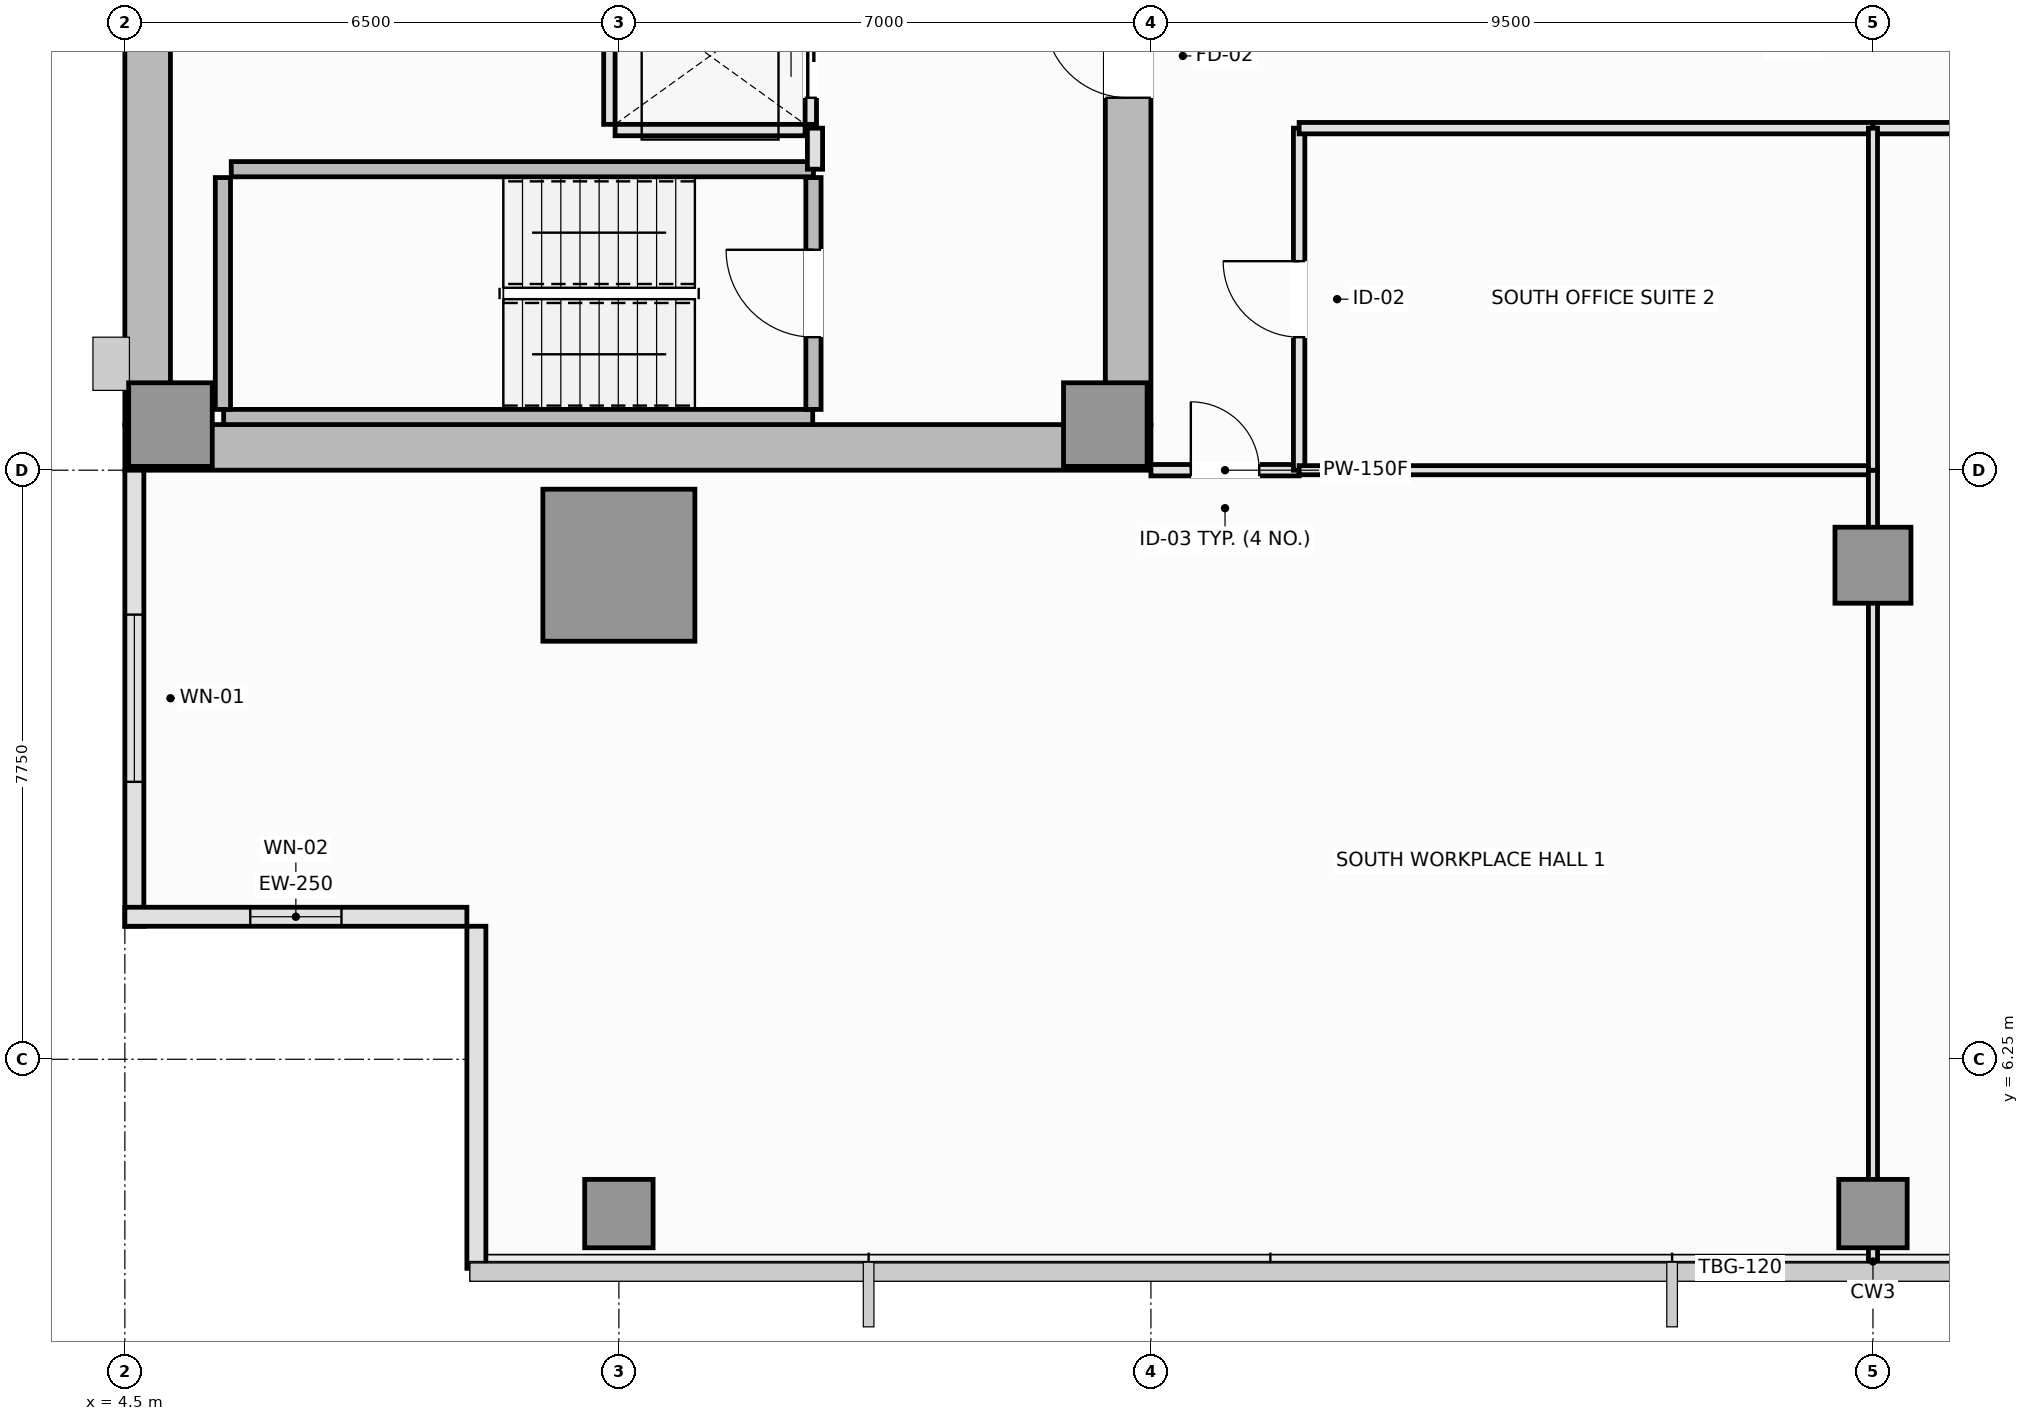
"""IFC4 building model, lengths in metres.
Left out: names, types, materials, properties, quantities, classifications, styles, units other than length and angle.
Written with IfcOpenShell. Run it as: python <this file> out.ifc"""

import sys

from ifc_helpers import new_model, si_unit, direction, frame, frame_2d, origin, origin_2d, place, context, subcontext, project, spatial, rectangle, extrude, element, fill, save


model = new_model("IFC4")
c1 = context("Model", 3, precision=1e-05, world=origin(), true_north=direction((0.0, 1.0)))
c2 = subcontext(c1, "Body", "Model", "MODEL_VIEW")
j1 = project(units=[si_unit("LENGTHUNIT", "METRE"), si_unit("PLANEANGLEUNIT", "RADIAN")], contexts=[c1])
p1 = place(None, origin())
s1 = spatial("IfcSite", under=j1, at=p1, CompositionType="ELEMENT")
p2 = place(p1, origin())
s2 = spatial("IfcBuilding", under=s1, at=p2, CompositionType="ELEMENT")
p3 = place(p2, frame((0.0, 0.0, 137.75)))
s3 = spatial("IfcBuildingStorey", under=s2, at=p3, CompositionType="ELEMENT", Elevation=137.75)
p4 = place(p3, frame((4.5, 14.3, 0.0), z_axis=(0.0, 0.0, 1.0), x_axis=(1.0, 0.0, 0.0)))
e1 = element("IfcWall", 1, at=p4, inside=s3, PredefinedType="SHEAR", context=c2, shape_type="SweptSolid", body=[
    extrude(rectangle(XDim=13.5, YDim=0.6, at=frame_2d((6.75, 0.0))), origin(), (0.0, 0.0, 1.0), 3.55),
])
p5 = place(p3, frame((4.8, 14.6, 0.0), z_axis=(0.0, 0.0, 1.0), x_axis=(0.0, 1.0, 0.0)))
e2 = element("IfcWall", 2, at=p5, inside=s3, PredefinedType="SHEAR", context=c2, shape_type="SweptSolid", body=[
    extrude(rectangle(XDim=21.3, YDim=0.6, at=frame_2d((10.65, 0.0))), origin(), (0.0, 0.0, 1.0), 3.55),
])
p6 = place(p3, frame((17.7, 14.6, 0.0), z_axis=(0.0, 0.0, 1.0), x_axis=(0.0, 1.0, 0.0)))
e3 = element("IfcWall", 3, at=p6, inside=s3, PredefinedType="SHEAR", context=c2, shape_type="SweptSolid", body=[
    extrude(rectangle(XDim=8.85, YDim=0.6, at=frame_2d((4.425, 0.0))), origin(), (0.0, 0.0, 1.0), 3.55),
])
p7 = place(p6, frame((4.3, 0.0, 0.0)))
e4 = element("IfcOpeningElement", 4, at=p7, cuts=e3, PredefinedType="OPENING", context=c2, shape_type="SweptSolid", body=[
    extrude(rectangle(XDim=1.1, YDim=2.15, at=frame_2d((0.55, 1.075))), frame((0.0, 0.31, 0.0), z_axis=(0.0, -1.0, 0.0), x_axis=(1.0, 0.0, 0.0)), (0.0, 0.0, 1.0), 0.62),
])
for number, where, z_axis, x_axis in (
    (5, (5.1, 14.6, 0.0), (0.0, 0.0, 1.0), (1.0, 0.0, 0.0)),
    (6, (17.4, 14.6, 0.0), (0.0, 0.0, 1.0), (1.0, 0.0, 0.0)),
):
    element("IfcColumn", number, at=place(p3, frame(where, z_axis=z_axis, x_axis=x_axis)), inside=s3, PredefinedType="PILASTER", context=c2, shape_type="SweptSolid", body=[
        extrude(rectangle(XDim=1.1, YDim=1.1, at=origin_2d()), origin(), (0.0, 0.0, 1.0), 3.55),
    ])
p8 = place(p3, frame((11.0, 12.75, 0.0), z_axis=(0.0, 0.0, 1.0), x_axis=(1.0, 0.0, 0.0)))
e7 = element("IfcColumn", 7, at=p8, inside=s3, PredefinedType="COLUMN", context=c2, shape_type="SweptSolid", body=[
    extrude(rectangle(XDim=2.0, YDim=2.0, at=origin_2d()), origin(), (0.0, 0.0, 1.0), 3.55),
])
p9 = place(p3, frame((27.5, 12.75, 0.0), z_axis=(0.0, 0.0, 1.0), x_axis=(1.0, 0.0, 0.0)))
e8 = element("IfcColumn", 8, at=p9, inside=s3, PredefinedType="COLUMN", context=c2, shape_type="SweptSolid", body=[
    extrude(rectangle(XDim=1.0, YDim=1.0, at=origin_2d()), origin(), (0.0, 0.0, 1.0), 3.55),
])
for number, where, z_axis, x_axis in (
    (9, (11.0, 4.22, 0.0), (0.0, 0.0, 1.0), (1.0, 0.0, 0.0)),
    (10, (27.5, 4.22, 0.0), (0.0, 0.0, 1.0), (1.0, 0.0, 0.0)),
):
    element("IfcColumn", number, at=place(p3, frame(where, z_axis=z_axis, x_axis=x_axis)), inside=s3, PredefinedType="COLUMN", context=c2, shape_type="SweptSolid", body=[
        extrude(rectangle(XDim=0.9, YDim=0.9, at=origin_2d()), origin(), (0.0, 0.0, 1.0), 3.55),
    ])
p10 = place(p3, frame((4.625, 14.0, 0.0), z_axis=(0.0, 0.0, 1.0), x_axis=(0.0, -1.0, 0.0)))
e11 = element("IfcWall", 11, at=p10, inside=s3, PredefinedType="SOLIDWALL", context=c2, shape_type="SweptSolid", body=[
    extrude(rectangle(XDim=6.0, YDim=0.25, at=frame_2d((3.0, 0.0))), origin(), (0.0, 0.0, 1.0), 3.37),
])
p11 = place(p10, frame((1.9, 0.0, 0.9)))
e12 = element("IfcOpeningElement", 12, at=p11, cuts=e11, PredefinedType="OPENING", context=c2, shape_type="SweptSolid", body=[
    extrude(rectangle(XDim=2.2, YDim=1.8, at=frame_2d((1.1, 0.9))), frame((0.0, 0.135, 0.0), z_axis=(0.0, -1.0, 0.0), x_axis=(1.0, 0.0, 0.0)), (0.0, 0.0, 1.0), 0.27),
])
p12 = place(p3, frame((4.5, 8.125, 0.0), z_axis=(0.0, 0.0, 1.0), x_axis=(1.0, 0.0, 0.0)))
e13 = element("IfcWall", 13, at=p12, inside=s3, PredefinedType="SOLIDWALL", context=c2, shape_type="SweptSolid", body=[
    extrude(rectangle(XDim=4.5, YDim=0.25, at=frame_2d((2.25, 0.0))), origin(), (0.0, 0.0, 1.0), 3.37),
])
p13 = place(p12, frame((1.65, 0.0, 0.9)))
e14 = element("IfcOpeningElement", 14, at=p13, cuts=e13, PredefinedType="OPENING", context=c2, shape_type="SweptSolid", body=[
    extrude(rectangle(XDim=1.2, YDim=1.8, at=frame_2d((0.6, 0.9))), frame((0.0, 0.135, 0.0), z_axis=(0.0, -1.0, 0.0), x_axis=(1.0, 0.0, 0.0)), (0.0, 0.0, 1.0), 0.27),
])
p14 = place(p3, frame((9.125, 8.0, 0.0), z_axis=(0.0, 0.0, 1.0), x_axis=(0.0, -1.0, 0.0)))
e15 = element("IfcWall", 15, at=p14, inside=s3, PredefinedType="SOLIDWALL", context=c2, shape_type="SweptSolid", body=[
    extrude(rectangle(XDim=4.5, YDim=0.25, at=frame_2d((2.25, 0.0))), origin(), (0.0, 0.0, 1.0), 3.37),
])
p15 = place(p3, frame((5.8, 14.7, 0.0), z_axis=(0.0, 0.0, 1.0), x_axis=(1.0, 0.0, 0.0)))
e16 = element("IfcWall", 16, at=p15, inside=s3, PredefinedType="SOLIDWALL", context=c2, shape_type="SweptSolid", body=[
    extrude(rectangle(XDim=7.75, YDim=0.2, at=frame_2d((3.875, 0.0))), origin(), (0.0, 0.0, 1.0), 3.55),
])
p16 = place(p3, frame((5.79, 14.8, 0.0), z_axis=(0.0, 0.0, 1.0), x_axis=(0.0, 1.0, 0.0)))
e17 = element("IfcWall", 17, at=p16, inside=s3, PredefinedType="SOLIDWALL", context=c2, shape_type="SweptSolid", body=[
    extrude(rectangle(XDim=3.05, YDim=0.2, at=frame_2d((1.525, 0.0))), origin(), (0.0, 0.0, 1.0), 3.55),
])
p17 = place(p3, frame((5.9, 17.96, 0.0), z_axis=(0.0, 0.0, 1.0), x_axis=(1.0, 0.0, 0.0)))
e18 = element("IfcWall", 18, at=p17, inside=s3, PredefinedType="SOLIDWALL", context=c2, shape_type="SweptSolid", body=[
    extrude(rectangle(XDim=7.66, YDim=0.2, at=frame_2d((3.83, 0.0))), origin(), (0.0, 0.0, 1.0), 3.55),
])
p18 = place(p3, frame((13.56, 14.8, 0.0), z_axis=(0.0, 0.0, 1.0), x_axis=(0.0, 1.0, 0.0)))
e19 = element("IfcWall", 19, at=p18, inside=s3, PredefinedType="SOLIDWALL", context=c2, shape_type="SweptSolid", body=[
    extrude(rectangle(XDim=3.05, YDim=0.2, at=frame_2d((1.525, 0.0))), origin(), (0.0, 0.0, 1.0), 3.55),
])
p19 = place(p18, frame((0.95, 0.0, 0.0)))
e20 = element("IfcOpeningElement", 20, at=p19, cuts=e19, PredefinedType="OPENING", context=c2, shape_type="SweptSolid", body=[
    extrude(rectangle(XDim=1.15, YDim=2.15, at=frame_2d((0.575, 1.075))), frame((0.0, 0.11, 0.0), z_axis=(0.0, -1.0, 0.0), x_axis=(1.0, 0.0, 0.0)), (0.0, 0.0, 1.0), 0.22),
])
p20 = place(p3, frame((10.95, 18.475, 0.0), z_axis=(0.0, 0.0, 1.0), x_axis=(1.0, 0.0, 0.0)))
e21 = element("IfcWall", 21, at=p20, inside=s3, PredefinedType="PARTITIONING", context=c2, shape_type="SweptSolid", body=[
    extrude(rectangle(XDim=2.5, YDim=0.15, at=frame_2d((1.25, 0.0))), origin(), (0.0, 0.0, 1.0), 3.37),
])
p21 = place(p3, frame((10.875, 18.55, 0.0), z_axis=(0.0, 0.0, 1.0), x_axis=(0.0, 1.0, 0.0)))
e22 = element("IfcWall", 22, at=p21, inside=s3, PredefinedType="PARTITIONING", context=c2, shape_type="SweptSolid", body=[
    extrude(rectangle(XDim=1.8, YDim=0.15, at=frame_2d((0.9, 0.0))), origin(), (0.0, 0.0, 1.0), 3.37),
])
p22 = place(p3, frame((13.525, 18.55, 0.0), z_axis=(0.0, 0.0, 1.0), x_axis=(0.0, 1.0, 0.0)))
e23 = element("IfcWall", 23, at=p22, inside=s3, PredefinedType="PARTITIONING", context=c2, shape_type="SweptSolid", body=[
    extrude(rectangle(XDim=1.8, YDim=0.15, at=frame_2d((0.9, 0.0))), origin(), (0.0, 0.0, 1.0), 3.37),
])
p23 = place(p22, frame((0.35, 0.0, 0.0)))
e24 = element("IfcOpeningElement", 24, at=p23, cuts=e23, PredefinedType="OPENING", context=c2, shape_type="SweptSolid", body=[
    extrude(rectangle(XDim=1.1, YDim=2.2, at=frame_2d((0.55, 1.1))), frame((0.0, 0.085, 0.0), z_axis=(0.0, -1.0, 0.0), x_axis=(1.0, 0.0, 0.0)), (0.0, 0.0, 1.0), 0.17),
])
p24 = place(p3, frame((13.58, 17.96, 0.0), z_axis=(0.0, 0.0, 1.0), x_axis=(0.0, 1.0, 0.0)))
e25 = element("IfcWall", 25, at=p24, inside=s3, PredefinedType="PARTITIONING", context=c2, shape_type="SweptSolid", body=[
    extrude(rectangle(XDim=0.54, YDim=0.2, at=frame_2d((0.27, 0.0))), origin(), (0.0, 0.0, 1.0), 3.37),
])
p25 = place(p3, frame((18.0, 14.0, 0.0), z_axis=(0.0, 0.0, 1.0), x_axis=(1.0, 0.0, 0.0)))
e26 = element("IfcWall", 26, at=p25, inside=s3, PredefinedType="PARTITIONING", context=c2, shape_type="SweptSolid", body=[
    extrude(rectangle(XDim=1.95, YDim=0.15, at=frame_2d((0.975, 0.0))), origin(), (0.0, 0.0, 1.0), 3.37),
])
p26 = place(p25, frame((0.525, 0.0, 0.0)))
e27 = element("IfcOpeningElement", 27, at=p26, cuts=e26, PredefinedType="OPENING", context=c2, shape_type="SweptSolid", body=[
    extrude(rectangle(XDim=0.9, YDim=2.1, at=frame_2d((0.45, 1.05))), frame((0.0, 0.085, 0.0), z_axis=(0.0, -1.0, 0.0), x_axis=(1.0, 0.0, 0.0)), (0.0, 0.0, 1.0), 0.17),
])
p27 = place(p3, frame((19.95, 14.0, 0.0), z_axis=(0.0, 0.0, 1.0), x_axis=(0.0, 1.0, 0.0)))
e28 = element("IfcWall", 28, at=p27, inside=s3, PredefinedType="PARTITIONING", context=c2, shape_type="SweptSolid", body=[
    extrude(rectangle(XDim=4.5, YDim=0.15, at=frame_2d((2.25, 0.0))), origin(), (0.0, 0.0, 1.0), 3.37),
])
p28 = place(p27, frame((1.75, 0.0, 0.0)))
e29 = element("IfcOpeningElement", 29, at=p28, cuts=e28, PredefinedType="OPENING", context=c2, shape_type="SweptSolid", body=[
    extrude(rectangle(XDim=1.0, YDim=2.15, at=frame_2d((0.5, 1.075))), frame((0.0, 0.085, 0.0), z_axis=(0.0, -1.0, 0.0), x_axis=(1.0, 0.0, 0.0)), (0.0, 0.0, 1.0), 0.17),
])
p29 = place(p3, frame((19.95, 18.5, 0.0), z_axis=(0.0, 0.0, 1.0), x_axis=(1.0, 0.0, 0.0)))
e30 = element("IfcWall", 30, at=p29, inside=s3, PredefinedType="PARTITIONING", context=c2, shape_type="SweptSolid", body=[
    extrude(rectangle(XDim=7.55, YDim=0.15, at=frame_2d((3.775, 0.0))), origin(), (0.0, 0.0, 1.0), 2.77),
])
p30 = place(p3, frame((27.5, 18.5, 0.0), z_axis=(0.0, 0.0, 1.0), x_axis=(1.0, 0.0, 0.0)))
e31 = element("IfcWall", 31, at=p30, inside=s3, PredefinedType="PARTITIONING", context=c2, shape_type="SweptSolid", body=[
    extrude(rectangle(XDim=5.9, YDim=0.15, at=frame_2d((2.95, 0.0))), origin(), (0.0, 0.0, 1.0), 2.77),
])
p31 = place(p30, frame((2.45, 0.0, 0.0)))
e32 = element("IfcOpeningElement", 32, at=p31, cuts=e31, PredefinedType="OPENING", context=c2, shape_type="SweptSolid", body=[
    extrude(rectangle(XDim=1.0, YDim=2.15, at=frame_2d((0.5, 1.075))), frame((0.0, 0.085, 0.0), z_axis=(0.0, -1.0, 0.0), x_axis=(1.0, 0.0, 0.0)), (0.0, 0.0, 1.0), 0.17),
])
p32 = place(p3, frame((19.95, 14.0, 0.0), z_axis=(0.0, 0.0, 1.0), x_axis=(1.0, 0.0, 0.0)))
e33 = element("IfcWall", 33, at=p32, inside=s3, PredefinedType="PARTITIONING", context=c2, shape_type="SweptSolid", body=[
    extrude(rectangle(XDim=7.55, YDim=0.12, at=frame_2d((3.775, 0.0))), origin(), (0.0, 0.0, 1.0), 3.37),
])
p33 = place(p3, frame((27.5, 3.51, 0.0), z_axis=(0.0, 0.0, 1.0), x_axis=(0.0, 1.0, 0.0)))
e34 = element("IfcWall", 34, at=p33, inside=s3, PredefinedType="PARTITIONING", context=c2, shape_type="SweptSolid", body=[
    extrude(rectangle(XDim=10.49, YDim=0.12, at=frame_2d((5.245, 0.0))), origin(), (0.0, 0.0, 1.0), 2.87),
])
p34 = place(p3, frame((27.5, 14.0, 0.0), z_axis=(0.0, 0.0, 1.0), x_axis=(0.0, 1.0, 0.0)))
e35 = element("IfcWall", 35, at=p34, inside=s3, PredefinedType="PARTITIONING", context=c2, shape_type="SweptSolid", body=[
    extrude(rectangle(XDim=4.5, YDim=0.12, at=frame_2d((2.25, 0.0))), origin(), (0.0, 0.0, 1.0), 3.37),
])
p35 = place(p11, origin())
e36 = element("IfcWindow", 36, at=p35, inside=s3, PartitioningType="SINGLE_PANEL", PredefinedType="WINDOW", context=c2, shape_type="SweptSolid", body=[
    extrude(rectangle(XDim=2.2, YDim=1.8, at=frame_2d((1.1, 0.9))), frame((0.0, 0.03, 0.0), z_axis=(0.0, -1.0, 0.0), x_axis=(1.0, 0.0, 0.0)), (0.0, 0.0, 1.0), 0.06),
])
fill(e12, e36)
p36 = place(p13, origin())
e37 = element("IfcWindow", 37, at=p36, inside=s3, PartitioningType="SINGLE_PANEL", PredefinedType="WINDOW", context=c2, shape_type="SweptSolid", body=[
    extrude(rectangle(XDim=1.2, YDim=1.8, at=frame_2d((0.6, 0.9))), frame((0.0, 0.03, 0.0), z_axis=(0.0, -1.0, 0.0), x_axis=(1.0, 0.0, 0.0)), (0.0, 0.0, 1.0), 0.06),
])
fill(e14, e37)
p37 = place(p19, origin())
e38 = element("IfcDoor", 38, at=p37, inside=s3, OperationType="SINGLE_SWING_RIGHT", PredefinedType="DOOR", context=c2, shape_type="SweptSolid", body=[
    extrude(rectangle(XDim=1.15, YDim=2.15, at=frame_2d((0.575, 1.075))), frame((0.0, 0.025, 0.0), z_axis=(0.0, -1.0, 0.0), x_axis=(1.0, 0.0, 0.0)), (0.0, 0.0, 1.0), 0.05),
])
fill(e20, e38)
p38 = place(p23, origin())
e39 = element("IfcDoor", 39, at=p38, inside=s3, OperationType="DOUBLE_DOOR_SLIDING", PredefinedType="DOOR", context=c2, shape_type="SweptSolid", body=[
    extrude(rectangle(XDim=1.1, YDim=2.2, at=frame_2d((0.55, 1.1))), frame((0.0, 0.025, 0.0), z_axis=(0.0, -1.0, 0.0), x_axis=(1.0, 0.0, 0.0)), (0.0, 0.0, 1.0), 0.05),
])
fill(e24, e39)
p39 = place(p7, origin())
e40 = element("IfcDoor", 40, at=p39, inside=s3, OperationType="SINGLE_SWING_RIGHT", PredefinedType="DOOR", context=c2, shape_type="SweptSolid", body=[
    extrude(rectangle(XDim=1.1, YDim=2.15, at=frame_2d((0.55, 1.075))), frame((0.0, 0.025, 0.0), z_axis=(0.0, -1.0, 0.0), x_axis=(1.0, 0.0, 0.0)), (0.0, 0.0, 1.0), 0.05),
])
fill(e4, e40)
p40 = place(p26, origin())
e41 = element("IfcDoor", 41, at=p40, inside=s3, OperationType="SINGLE_SWING_LEFT", PredefinedType="DOOR", context=c2, shape_type="SweptSolid", body=[
    extrude(rectangle(XDim=0.9, YDim=2.1, at=frame_2d((0.45, 1.05))), frame((0.0, 0.025, 0.0), z_axis=(0.0, -1.0, 0.0), x_axis=(1.0, 0.0, 0.0)), (0.0, 0.0, 1.0), 0.05),
])
fill(e27, e41)
p41 = place(p28, origin())
e42 = element("IfcDoor", 42, at=p41, inside=s3, OperationType="SINGLE_SWING_RIGHT", PredefinedType="DOOR", context=c2, shape_type="SweptSolid", body=[
    extrude(rectangle(XDim=1.0, YDim=2.15, at=frame_2d((0.5, 1.075))), frame((0.0, 0.025, 0.0), z_axis=(0.0, -1.0, 0.0), x_axis=(1.0, 0.0, 0.0)), (0.0, 0.0, 1.0), 0.05),
])
fill(e29, e42)
save(model, sys.argv[1])
